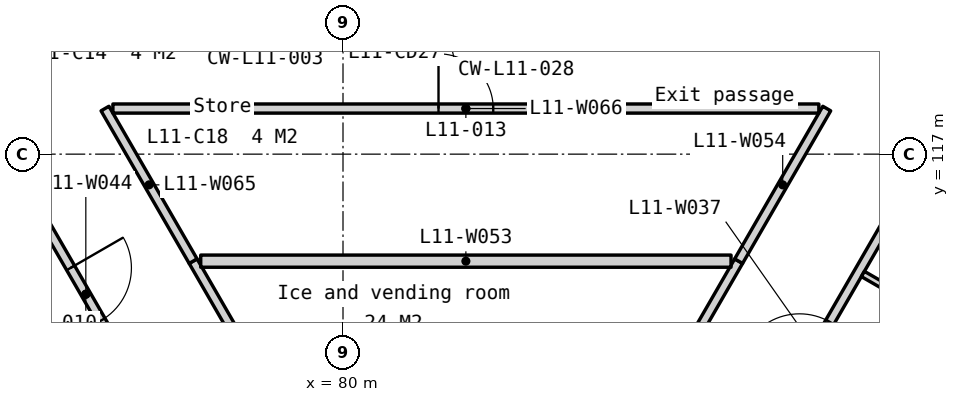
"""IFC4 building model, lengths in metres.
Left out: names, types, materials, properties, quantities, classifications, styles, units other than length and angle.
Written with IfcOpenShell. Run it as: python <this file> out.ifc"""

import sys

from ifc_helpers import new_model, si_unit, direction, frame, frame_2d, origin, place, context, subcontext, project, spatial, polyline, rectangle, outline, extrude, element, fill, save


model = new_model("IFC4")
c1 = context("Model", 3, precision=1e-05, world=origin(), true_north=direction((0.0, 1.0)))
c2 = subcontext(c1, "Body", "Model", "MODEL_VIEW")
j1 = project(units=[si_unit("LENGTHUNIT", "METRE"), si_unit("PLANEANGLEUNIT", "RADIAN")], contexts=[c1])
p1 = place(None, origin())
s1 = spatial("IfcSite", under=j1, at=p1, CompositionType="ELEMENT")
p2 = place(p1, origin())
s2 = spatial("IfcBuilding", under=s1, at=p2, CompositionType="ELEMENT")
p3 = place(p2, frame((0.0, 0.0, 52.5)))
s3 = spatial("IfcBuildingStorey", under=s2, at=p3, CompositionType="ELEMENT", Elevation=52.5)
p4 = place(p3, frame((83.105, 90.599, -0.15), z_axis=(0.0, 0.0, 1.0), x_axis=(0.499999201451, 0.866025864826, 0.0)))
e1 = element("IfcWall", 1, at=p4, inside=s3, PredefinedType="SOLIDWALL", context=c2, shape_type="SweptSolid", body=[
    extrude(outline(polyline([(44.8, 0.0), (44.8, 3.5), (0.0, 3.5), (0.0, 0.0), (44.8, 0.0)])), frame((0.0, 0.225, 0.0), z_axis=(0.0, -1.0, 0.0), x_axis=(1.0, 0.0, 0.0)), (0.0, 0.0, 1.0), 0.45),
])
p5 = place(p4, frame((0.722, 0.0, 1.05)))
e2 = element("IfcOpeningElement", 2, at=p5, cuts=e1, PredefinedType="OPENING", context=c2, shape_type="SweptSolid", body=[
    extrude(rectangle(XDim=1.2, YDim=1.5, at=frame_2d((0.6, 0.75))), frame((0.0, 0.235, 0.0), z_axis=(0.0, -1.0, 0.0), x_axis=(1.0, 0.0, 0.0)), (0.0, 0.0, 1.0), 0.47),
])
p6 = place(p4, frame((7.51, 0.0, 1.05)))
e3 = element("IfcOpeningElement", 3, at=p6, cuts=e1, PredefinedType="OPENING", context=c2, shape_type="SweptSolid", body=[
    extrude(rectangle(XDim=1.2, YDim=1.5, at=frame_2d((0.6, 0.75))), frame((0.0, 0.235, 0.0), z_axis=(0.0, -1.0, 0.0), x_axis=(1.0, 0.0, 0.0)), (0.0, 0.0, 1.0), 0.47),
])
p7 = place(p4, frame((9.21, 0.0, 1.05)))
e4 = element("IfcOpeningElement", 4, at=p7, cuts=e1, PredefinedType="OPENING", context=c2, shape_type="SweptSolid", body=[
    extrude(rectangle(XDim=1.2, YDim=1.5, at=frame_2d((0.6, 0.75))), frame((0.0, 0.235, 0.0), z_axis=(0.0, -1.0, 0.0), x_axis=(1.0, 0.0, 0.0)), (0.0, 0.0, 1.0), 0.47),
])
p8 = place(p4, frame((16.47, 0.0, 1.05)))
e5 = element("IfcOpeningElement", 5, at=p8, cuts=e1, PredefinedType="OPENING", context=c2, shape_type="SweptSolid", body=[
    extrude(rectangle(XDim=1.2, YDim=1.5, at=frame_2d((0.6, 0.75))), frame((0.0, 0.235, 0.0), z_axis=(0.0, -1.0, 0.0), x_axis=(1.0, 0.0, 0.0)), (0.0, 0.0, 1.0), 0.47),
])
p9 = place(p4, frame((18.17, 0.0, 1.05)))
e6 = element("IfcOpeningElement", 6, at=p9, cuts=e1, PredefinedType="OPENING", context=c2, shape_type="SweptSolid", body=[
    extrude(rectangle(XDim=1.2, YDim=1.5, at=frame_2d((0.6, 0.75))), frame((0.0, 0.235, 0.0), z_axis=(0.0, -1.0, 0.0), x_axis=(1.0, 0.0, 0.0)), (0.0, 0.0, 1.0), 0.47),
])
p10 = place(p4, frame((25.43, 0.0, 1.05)))
e7 = element("IfcOpeningElement", 7, at=p10, cuts=e1, PredefinedType="OPENING", context=c2, shape_type="SweptSolid", body=[
    extrude(rectangle(XDim=1.2, YDim=1.5, at=frame_2d((0.6, 0.75))), frame((0.0, 0.235, 0.0), z_axis=(0.0, -1.0, 0.0), x_axis=(1.0, 0.0, 0.0)), (0.0, 0.0, 1.0), 0.47),
])
p11 = place(p4, frame((27.13, 0.0, 1.05)))
e8 = element("IfcOpeningElement", 8, at=p11, cuts=e1, PredefinedType="OPENING", context=c2, shape_type="SweptSolid", body=[
    extrude(rectangle(XDim=1.2, YDim=1.5, at=frame_2d((0.6, 0.75))), frame((0.0, 0.235, 0.0), z_axis=(0.0, -1.0, 0.0), x_axis=(1.0, 0.0, 0.0)), (0.0, 0.0, 1.0), 0.47),
])
p12 = place(p4, frame((34.39, 0.0, 1.05)))
e9 = element("IfcOpeningElement", 9, at=p12, cuts=e1, PredefinedType="OPENING", context=c2, shape_type="SweptSolid", body=[
    extrude(rectangle(XDim=1.2, YDim=1.5, at=frame_2d((0.6, 0.75))), frame((0.0, 0.235, 0.0), z_axis=(0.0, -1.0, 0.0), x_axis=(1.0, 0.0, 0.0)), (0.0, 0.0, 1.0), 0.47),
])
p13 = place(p4, frame((36.09, 0.0, 1.05)))
e10 = element("IfcOpeningElement", 10, at=p13, cuts=e1, PredefinedType="OPENING", context=c2, shape_type="SweptSolid", body=[
    extrude(rectangle(XDim=1.2, YDim=1.5, at=frame_2d((0.6, 0.75))), frame((0.0, 0.235, 0.0), z_axis=(0.0, -1.0, 0.0), x_axis=(1.0, 0.0, 0.0)), (0.0, 0.0, 1.0), 0.47),
])
p14 = place(p4, frame((42.878, 0.0, 1.05)))
e11 = element("IfcOpeningElement", 11, at=p14, cuts=e1, PredefinedType="OPENING", context=c2, shape_type="SweptSolid", body=[
    extrude(rectangle(XDim=1.2, YDim=1.5, at=frame_2d((0.6, 0.75))), frame((0.0, 0.235, 0.0), z_axis=(0.0, -1.0, 0.0), x_axis=(1.0, 0.0, 0.0)), (0.0, 0.0, 1.0), 0.47),
])
p15 = place(p3, frame((85.505, 109.906, 0.0), z_axis=(0.0, 0.0, 1.0), x_axis=(0.500017993482, 0.866015014994, 0.0)))
e12 = element("IfcWall", 12, at=p15, inside=s3, PredefinedType="PARTITIONING", context=c2, shape_type="SweptSolid", body=[
    extrude(rectangle(XDim=9.01, YDim=0.15, at=frame_2d((4.505, 0.0))), origin(), (0.0, 0.0, 1.0), 3.35),
])
p16 = place(p15, frame((4.005, 0.0, 0.0)))
e13 = element("IfcOpeningElement", 13, at=p16, cuts=e12, PredefinedType="OPENING", context=c2, shape_type="SweptSolid", body=[
    extrude(rectangle(XDim=1.0, YDim=2.1, at=frame_2d((0.5, 1.05))), frame((0.0, 0.085, 0.0), z_axis=(0.0, -1.0, 0.0), x_axis=(1.0, 0.0, 0.0)), (0.0, 0.0, 1.0), 0.17),
])
p17 = place(p3, frame((84.26, 111.35, 0.0), z_axis=(0.0, 0.0, 1.0), x_axis=(0.500003186274, 0.866023564181, 0.0)))
e14 = element("IfcWall", 14, at=p17, inside=s3, PredefinedType="PARTITIONING", context=c2, shape_type="SweptSolid", body=[
    extrude(rectangle(XDim=4.492, YDim=0.15, at=frame_2d((2.246, 0.0))), origin(), (0.0, 0.0, 1.0), 3.35),
])
p18 = place(p17, frame((1.796, 0.0, 0.0)))
e15 = element("IfcOpeningElement", 15, at=p18, cuts=e14, PredefinedType="OPENING", context=c2, shape_type="SweptSolid", body=[
    extrude(rectangle(XDim=0.9, YDim=2.1, at=frame_2d((0.45, 1.05))), frame((0.0, 0.085, 0.0), z_axis=(0.0, -1.0, 0.0), x_axis=(1.0, 0.0, 0.0)), (0.0, 0.0, 1.0), 0.17),
])
p19 = place(p3, frame((74.007, 117.75, 0.0), z_axis=(0.0, 0.0, 1.0), x_axis=(0.500026110575, -0.866010328312, 0.0)))
e16 = element("IfcWall", 16, at=p19, inside=s3, PredefinedType="PARTITIONING", context=c2, shape_type="SweptSolid", body=[
    extrude(rectangle(XDim=7.052, YDim=0.15, at=frame_2d((3.526, 0.0))), origin(), (0.0, 0.0, 1.0), 3.35),
])
p20 = place(p19, frame((3.026, 0.0, 0.0)))
e17 = element("IfcOpeningElement", 17, at=p20, cuts=e16, PredefinedType="OPENING", context=c2, shape_type="SweptSolid", body=[
    extrude(rectangle(XDim=1.0, YDim=2.1, at=frame_2d((0.5, 1.05))), frame((0.0, 0.085, 0.0), z_axis=(0.0, -1.0, 0.0), x_axis=(1.0, 0.0, 0.0)), (0.0, 0.0, 1.0), 0.17),
])
p21 = place(p3, frame((88.55, 115.03, 0.0), z_axis=(0.0, 0.0, 1.0), x_axis=(0.866012076814, -0.50002308228, 0.0)))
e18 = element("IfcWall", 18, at=p21, inside=s3, PredefinedType="PARTITIONING", context=c2, shape_type="SweptSolid", body=[
    extrude(rectangle(XDim=2.765, YDim=0.1, at=frame_2d((1.382, 0.0))), origin(), (0.0, 0.0, 1.0), 3.35),
])
p22 = place(p3, frame((77.535, 115.24, 0.0), z_axis=(0.0, 0.0, 1.0), x_axis=(0.500043949999, -0.866000027754, 0.0)))
e19 = element("IfcWall", 19, at=p22, inside=s3, PredefinedType="PARTITIONING", context=c2, shape_type="SweptSolid", body=[
    extrude(rectangle(XDim=4.492, YDim=0.15, at=frame_2d((2.246, 0.0))), origin(), (0.0, 0.0, 1.0), 3.35),
])
p23 = place(p3, frame((77.66, 115.24, 0.0), z_axis=(0.0, 0.0, 1.0), x_axis=(1.0, 0.0, 0.0)))
e20 = element("IfcWall", 20, at=p23, inside=s3, PredefinedType="PARTITIONING", context=c2, shape_type="SweptSolid", body=[
    extrude(rectangle(XDim=8.721, YDim=0.2, at=frame_2d((4.361, 0.0))), origin(), (0.0, 0.0, 1.0), 3.35),
])
p24 = place(p3, frame((86.506, 115.24, 0.0), z_axis=(0.0, 0.0, 1.0), x_axis=(0.500016544581, 0.866015851556, 0.0)))
e21 = element("IfcWall", 21, at=p24, inside=s3, PredefinedType="PARTITIONING", context=c2, shape_type="SweptSolid", body=[
    extrude(rectangle(XDim=2.898, YDim=0.15, at=frame_2d((1.449, 0.0))), origin(), (0.0, 0.0, 1.0), 3.35),
])
p25 = place(p3, frame((88.851, 108.101, 0.0), z_axis=(0.0, 0.0, 1.0), x_axis=(0.500004234368, 0.866022959057, 0.0)))
e22 = element("IfcWall", 22, at=p25, inside=s3, PredefinedType="PARTITIONING", context=c2, shape_type="SweptSolid", body=[
    extrude(rectangle(XDim=8.75, YDim=0.1, at=frame_2d((4.375, 0.0))), origin(), (0.0, 0.0, 1.0), 3.35),
])
p26 = place(p25, frame((3.925, 0.0, 0.0)))
e23 = element("IfcOpeningElement", 23, at=p26, cuts=e22, PredefinedType="OPENING", context=c2, shape_type="SweptSolid", body=[
    extrude(rectangle(XDim=0.9, YDim=2.1, at=frame_2d((0.45, 1.05))), frame((0.0, 0.06, 0.0), z_axis=(0.0, -1.0, 0.0), x_axis=(1.0, 0.0, 0.0)), (0.0, 0.0, 1.0), 0.12),
])
p27 = place(p3, frame((76.086, 117.75, 0.0), z_axis=(0.0, 0.0, 1.0), x_axis=(0.499953366038, -0.866052326241, 0.0)))
e24 = element("IfcWall", 24, at=p27, inside=s3, PredefinedType="PARTITIONING", context=c2, shape_type="SweptSolid", body=[
    extrude(rectangle(XDim=2.898, YDim=0.15, at=frame_2d((1.449, 0.0))), origin(), (0.0, 0.0, 1.0), 3.35),
])
p28 = place(p3, frame((76.216, 117.75, 0.0), z_axis=(0.0, 0.0, 1.0), x_axis=(1.0, 0.0, 0.0)))
e25 = element("IfcWall", 25, at=p28, inside=s3, PredefinedType="PARTITIONING", context=c2, shape_type="SweptSolid", body=[
    extrude(rectangle(XDim=11.61, YDim=0.15, at=frame_2d((5.805, 0.0))), origin(), (0.0, 0.0, 1.0), 2.938),
])
p29 = place(p28, frame((5.355, 0.0, 0.0)))
e26 = element("IfcOpeningElement", 26, at=p29, cuts=e25, PredefinedType="OPENING", context=c2, shape_type="SweptSolid", body=[
    extrude(rectangle(XDim=0.9, YDim=2.1, at=frame_2d((0.45, 1.05))), frame((0.0, 0.085, 0.0), z_axis=(0.0, -1.0, 0.0), x_axis=(1.0, 0.0, 0.0)), (0.0, 0.0, 1.0), 0.17),
])
p30 = place(p20, origin())
e27 = element("IfcDoor", 27, at=p30, inside=s3, OperationType="SINGLE_SWING_LEFT", PredefinedType="DOOR", context=c2, shape_type="SweptSolid", body=[
    extrude(rectangle(XDim=1.0, YDim=2.1, at=frame_2d((0.5, 1.05))), frame((0.0, 0.025, 0.0), z_axis=(0.0, -1.0, 0.0), x_axis=(1.0, 0.0, 0.0)), (0.0, 0.0, 1.0), 0.05),
])
fill(e17, e27)
p31 = place(p29, origin())
e28 = element("IfcDoor", 28, at=p31, inside=s3, OperationType="SINGLE_SWING_LEFT", PredefinedType="DOOR", context=c2, shape_type="SweptSolid", body=[
    extrude(rectangle(XDim=0.9, YDim=2.1, at=frame_2d((0.45, 1.05))), frame((0.0, 0.025, 0.0), z_axis=(0.0, -1.0, 0.0), x_axis=(1.0, 0.0, 0.0)), (0.0, 0.0, 1.0), 0.05),
])
fill(e26, e28)
p32 = place(p16, origin())
e29 = element("IfcDoor", 29, at=p32, inside=s3, OperationType="SINGLE_SWING_LEFT", PredefinedType="DOOR", context=c2, shape_type="SweptSolid", body=[
    extrude(rectangle(XDim=1.0, YDim=2.1, at=frame_2d((0.5, 1.05))), frame((0.0, 0.025, 0.0), z_axis=(0.0, -1.0, 0.0), x_axis=(1.0, 0.0, 0.0)), (0.0, 0.0, 1.0), 0.05),
])
fill(e13, e29)
save(model, sys.argv[1])
